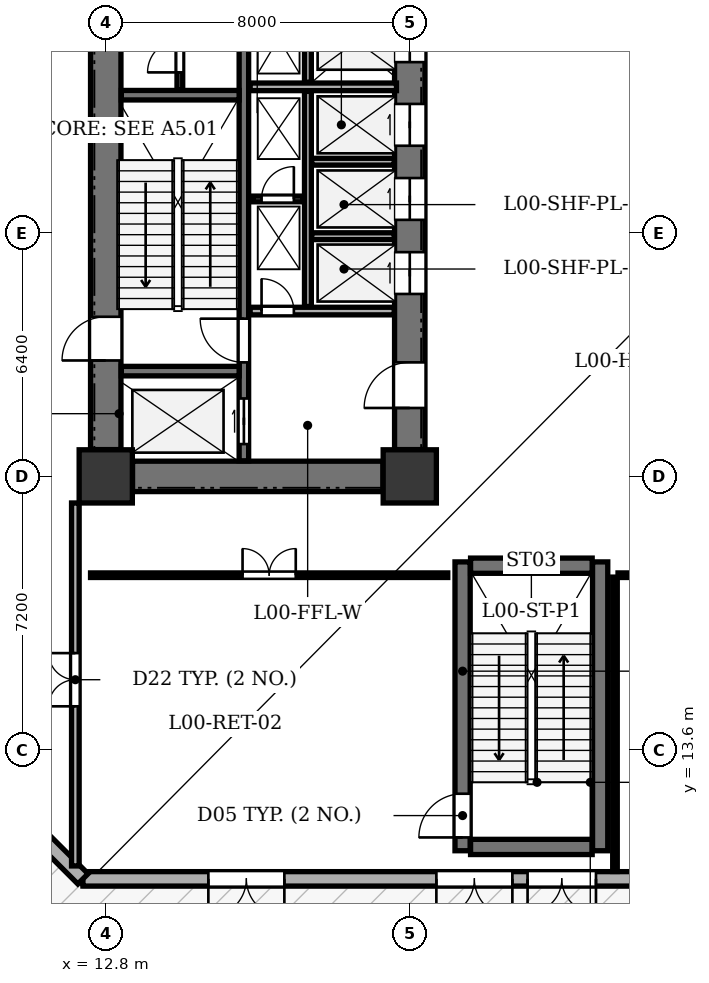
"""IFC4 building model, lengths in metres.
Left out: names, types, materials, properties, quantities, classifications, styles, units other than length and angle.
Written with IfcOpenShell. Run it as: python <this file> out.ifc"""

import sys

from ifc_helpers import new_model, si_unit, direction, frame, frame_2d, origin, origin_2d, place, context, subcontext, project, spatial, rectangle, extrude, element, fill, save


model = new_model("IFC4")
c1 = context("Model", 3, precision=1e-05, world=origin(), true_north=direction((0.0, 1.0)))
c2 = subcontext(c1, "Body", "Model", "MODEL_VIEW")
j1 = project(units=[si_unit("LENGTHUNIT", "METRE"), si_unit("PLANEANGLEUNIT", "RADIAN")], contexts=[c1])
p1 = place(None, origin())
s1 = spatial("IfcSite", under=j1, at=p1, CompositionType="ELEMENT")
p2 = place(p1, origin())
s2 = spatial("IfcBuilding", under=s1, at=p2, CompositionType="ELEMENT")
p3 = place(p2, origin())
s3 = spatial("IfcBuildingStorey", under=s2, at=p3, CompositionType="ELEMENT", Elevation=0.0)
for number, where, z_axis, x_axis in (
    (1, (12.8, 20.8, 0.0), (0.0, 0.0, 1.0), (1.0, 0.0, 0.0)),
    (2, (20.8, 20.8, 0.0), (0.0, 0.0, 1.0), (1.0, 0.0, 0.0)),
):
    element("IfcColumn", number, at=place(p3, frame(where, z_axis=z_axis, x_axis=x_axis)), inside=s3, PredefinedType="COLUMN", context=c2, shape_type="SweptSolid", body=[
        extrude(rectangle(XDim=1.4, YDim=1.4, at=origin_2d()), origin(), (0.0, 0.0, 1.0), 5.4),
    ])
p4 = place(p3, frame((46.3, 10.21, 0.0), z_axis=(0.0, 0.0, 1.0), x_axis=(-1.0, 0.0, 0.0)))
e3 = element("IfcWall", 3, at=p4, inside=s3, PredefinedType="STANDARD", context=c2, shape_type="SweptSolid", body=[
    extrude(rectangle(XDim=34.1, YDim=0.38, at=frame_2d((17.05, 0.0))), origin(), (0.0, 0.0, 1.0), 3.135),
])
p5 = place(p4, frame((13.8, 0.0, 0.0)))
e4 = element("IfcOpeningElement", 4, at=p5, cuts=e3, PredefinedType="OPENING", context=c2, shape_type="SweptSolid", body=[
    extrude(rectangle(XDim=2.0, YDim=2.3, at=frame_2d((1.0, 1.15))), frame((0.0, 0.2, 0.0), z_axis=(0.0, -1.0, 0.0), x_axis=(1.0, 0.0, 0.0)), (0.0, 0.0, 1.0), 0.4),
])
p6 = place(p4, frame((20.6, 0.0, 0.0)))
e5 = element("IfcOpeningElement", 5, at=p6, cuts=e3, PredefinedType="OPENING", context=c2, shape_type="SweptSolid", body=[
    extrude(rectangle(XDim=1.8, YDim=2.3, at=frame_2d((0.9, 1.15))), frame((0.0, 0.2, 0.0), z_axis=(0.0, -1.0, 0.0), x_axis=(1.0, 0.0, 0.0)), (0.0, 0.0, 1.0), 0.4),
])
p7 = place(p4, frame((22.8, 0.0, 0.0)))
e6 = element("IfcOpeningElement", 6, at=p7, cuts=e3, PredefinedType="OPENING", context=c2, shape_type="SweptSolid", body=[
    extrude(rectangle(XDim=2.0, YDim=2.3, at=frame_2d((1.0, 1.15))), frame((0.0, 0.2, 0.0), z_axis=(0.0, -1.0, 0.0), x_axis=(1.0, 0.0, 0.0)), (0.0, 0.0, 1.0), 0.4),
])
p8 = place(p4, frame((28.8, 0.0, 0.0)))
e7 = element("IfcOpeningElement", 7, at=p8, cuts=e3, PredefinedType="OPENING", context=c2, shape_type="SweptSolid", body=[
    extrude(rectangle(XDim=2.0, YDim=2.3, at=frame_2d((1.0, 1.15))), frame((0.0, 0.2, 0.0), z_axis=(0.0, -1.0, 0.0), x_axis=(1.0, 0.0, 0.0)), (0.0, 0.0, 1.0), 0.4),
])
p9 = place(p3, frame((12.2, 10.21, 0.0), z_axis=(0.0, 0.0, 1.0), x_axis=(-0.707106781187, 0.707106781187, 0.0)))
e8 = element("IfcWall", 8, at=p9, inside=s3, PredefinedType="STANDARD", context=c2, shape_type="SweptSolid", body=[
    extrude(rectangle(XDim=3.946, YDim=0.38, at=frame_2d((1.973, 0.0))), origin(), (0.0, 0.0, 1.0), 4.95),
])
p10 = place(p3, frame((12.8, 21.505, 0.0), z_axis=(0.0, 0.0, 1.0), x_axis=(0.0, 1.0, 0.0)))
e9 = element("IfcWall", 9, at=p10, inside=s3, PredefinedType="SHEAR", context=c2, shape_type="SweptSolid", body=[
    extrude(rectangle(XDim=11.39, YDim=0.8, at=frame_2d((5.695, 0.0))), origin(), (0.0, 0.0, 1.0), 4.95),
])
p11 = place(p10, frame((2.345, 0.0, 0.0)))
e10 = element("IfcOpeningElement", 10, at=p11, cuts=e9, PredefinedType="OPENING", context=c2, shape_type="SweptSolid", body=[
    extrude(rectangle(XDim=1.15, YDim=2.15, at=frame_2d((0.575, 1.075))), frame((0.0, 0.41, 0.0), z_axis=(0.0, -1.0, 0.0), x_axis=(1.0, 0.0, 0.0)), (0.0, 0.0, 1.0), 0.82),
])
p12 = place(p3, frame((13.505, 20.8, 0.0), z_axis=(0.0, 0.0, 1.0), x_axis=(1.0, 0.0, 0.0)))
e11 = element("IfcWall", 11, at=p12, inside=s3, PredefinedType="SHEAR", context=c2, shape_type="SweptSolid", body=[
    extrude(rectangle(XDim=6.59, YDim=0.8, at=frame_2d((3.295, 0.0))), origin(), (0.0, 0.0, 1.0), 4.95),
])
p13 = place(p3, frame((20.8, 21.505, 0.0), z_axis=(0.0, 0.0, 1.0), x_axis=(0.0, 1.0, 0.0)))
e12 = element("IfcWall", 12, at=p13, inside=s3, PredefinedType="SHEAR", context=c2, shape_type="SweptSolid", body=[
    extrude(rectangle(XDim=11.39, YDim=0.8, at=frame_2d((5.695, 0.0))), origin(), (0.0, 0.0, 1.0), 4.95),
])
p14 = place(p13, frame((1.095, 0.0, 0.0)))
e13 = element("IfcOpeningElement", 13, at=p14, cuts=e12, PredefinedType="OPENING", context=c2, shape_type="SweptSolid", body=[
    extrude(rectangle(XDim=1.2, YDim=2.15, at=frame_2d((0.6, 1.075))), frame((0.0, 0.41, 0.0), z_axis=(0.0, -1.0, 0.0), x_axis=(1.0, 0.0, 0.0)), (0.0, 0.0, 1.0), 0.82),
])
p15 = place(p13, frame((4.095, 0.0, 0.0)))
e14 = element("IfcOpeningElement", 14, at=p15, cuts=e12, PredefinedType="OPENING", context=c2, shape_type="SweptSolid", body=[
    extrude(rectangle(XDim=1.1, YDim=2.1, at=frame_2d((0.55, 1.05))), frame((0.0, 0.41, 0.0), z_axis=(0.0, -1.0, 0.0), x_axis=(1.0, 0.0, 0.0)), (0.0, 0.0, 1.0), 0.82),
])
p16 = place(p13, frame((6.045, 0.0, 0.0)))
e15 = element("IfcOpeningElement", 15, at=p16, cuts=e12, PredefinedType="OPENING", context=c2, shape_type="SweptSolid", body=[
    extrude(rectangle(XDim=1.1, YDim=2.1, at=frame_2d((0.55, 1.05))), frame((0.0, 0.41, 0.0), z_axis=(0.0, -1.0, 0.0), x_axis=(1.0, 0.0, 0.0)), (0.0, 0.0, 1.0), 0.82),
])
p17 = place(p13, frame((7.995, 0.0, 0.0)))
e16 = element("IfcOpeningElement", 16, at=p17, cuts=e12, PredefinedType="OPENING", context=c2, shape_type="SweptSolid", body=[
    extrude(rectangle(XDim=1.1, YDim=2.1, at=frame_2d((0.55, 1.05))), frame((0.0, 0.41, 0.0), z_axis=(0.0, -1.0, 0.0), x_axis=(1.0, 0.0, 0.0)), (0.0, 0.0, 1.0), 0.82),
])
p18 = place(p13, frame((10.195, 0.0, 0.0)))
e17 = element("IfcOpeningElement", 17, at=p18, cuts=e12, PredefinedType="OPENING", context=c2, shape_type="SweptSolid", body=[
    extrude(rectangle(XDim=1.1, YDim=2.1, at=frame_2d((0.55, 1.05))), frame((0.0, 0.41, 0.0), z_axis=(0.0, -1.0, 0.0), x_axis=(1.0, 0.0, 0.0)), (0.0, 0.0, 1.0), 0.82),
])
p19 = place(p3, frame((16.435, 21.21, 0.0), z_axis=(0.0, 0.0, 1.0), x_axis=(0.0, 1.0, 0.0)))
e18 = element("IfcWall", 18, at=p19, inside=s3, PredefinedType="SHEAR", context=c2, shape_type="SweptSolid", body=[
    extrude(rectangle(XDim=11.98, YDim=0.25, at=frame_2d((5.99, 0.0))), origin(), (0.0, 0.0, 1.0), 4.95),
])
p20 = place(p19, frame((0.44, 0.0, 0.0)))
e19 = element("IfcOpeningElement", 19, at=p20, cuts=e18, PredefinedType="OPENING", context=c2, shape_type="SweptSolid", body=[
    extrude(rectangle(XDim=1.2, YDim=2.15, at=frame_2d((0.6, 1.075))), frame((0.0, 0.135, 0.0), z_axis=(0.0, -1.0, 0.0), x_axis=(1.0, 0.0, 0.0)), (0.0, 0.0, 1.0), 0.27),
])
p21 = place(p19, frame((2.59, 0.0, 0.0)))
e20 = element("IfcOpeningElement", 20, at=p21, cuts=e18, PredefinedType="OPENING", context=c2, shape_type="SweptSolid", body=[
    extrude(rectangle(XDim=1.15, YDim=2.15, at=frame_2d((0.575, 1.075))), frame((0.0, 0.135, 0.0), z_axis=(0.0, -1.0, 0.0), x_axis=(1.0, 0.0, 0.0)), (0.0, 0.0, 1.0), 0.27),
])
for number, where, z_axis, x_axis in (
    (21, (13.21, 23.57, 0.0), (0.0, 0.0, 1.0), (1.0, 0.0, 0.0)),
    (22, (13.21, 30.83, 0.0), (0.0, 0.0, 1.0), (1.0, 0.0, 0.0)),
):
    element("IfcWall", number, at=place(p3, frame(where, z_axis=z_axis, x_axis=x_axis)), inside=s3, PredefinedType="SHEAR", context=c2, shape_type="SweptSolid", body=[
        extrude(rectangle(XDim=3.1, YDim=0.25, at=frame_2d((1.55, 0.0))), origin(), (0.0, 0.0, 1.0), 4.95),
    ])
p22 = place(p3, frame((16.6, 25.15, 0.0), z_axis=(0.0, 0.0, 1.0), x_axis=(1.0, 0.0, 0.0)))
e23 = element("IfcWall", 23, at=p22, inside=s3, PredefinedType="SOLIDWALL", context=c2, shape_type="SweptSolid", body=[
    extrude(rectangle(XDim=3.79, YDim=0.2, at=frame_2d((1.895, 0.0))), origin(), (0.0, 0.0, 1.0), 4.95),
])
p23 = place(p22, frame((0.3, 0.0, 0.0)))
e24 = element("IfcOpeningElement", 24, at=p23, cuts=e23, PredefinedType="OPENING", context=c2, shape_type="SweptSolid", body=[
    extrude(rectangle(XDim=0.85, YDim=2.02, at=frame_2d((0.425, 1.01))), frame((0.0, 0.11, 0.0), z_axis=(0.0, -1.0, 0.0), x_axis=(1.0, 0.0, 0.0)), (0.0, 0.0, 1.0), 0.22),
])
p24 = place(p3, frame((16.6, 31.05, 0.0), z_axis=(0.0, 0.0, 1.0), x_axis=(1.0, 0.0, 0.0)))
e25 = element("IfcWall", 25, at=p24, inside=s3, PredefinedType="SOLIDWALL", context=c2, shape_type="SweptSolid", body=[
    extrude(rectangle(XDim=3.85, YDim=0.2, at=frame_2d((1.925, 0.0))), origin(), (0.0, 0.0, 1.0), 4.95),
])
p25 = place(p3, frame((18.12, 25.27, 0.0), z_axis=(0.0, 0.0, 1.0), x_axis=(0.0, 1.0, 0.0)))
e26 = element("IfcWall", 26, at=p25, inside=s3, PredefinedType="PARTITIONING", context=c2, shape_type="SweptSolid", body=[
    extrude(rectangle(XDim=5.66, YDim=0.18, at=frame_2d((2.83, 0.0))), origin(), (0.0, 0.0, 1.0), 4.95),
])
p26 = place(p3, frame((18.12, 31.17, 0.0), z_axis=(0.0, 0.0, 1.0), x_axis=(0.0, 1.0, 0.0)))
e27 = element("IfcWall", 27, at=p26, inside=s3, PredefinedType="PARTITIONING", context=c2, shape_type="SweptSolid", body=[
    extrude(rectangle(XDim=2.02, YDim=0.18, at=frame_2d((1.01, 0.0))), origin(), (0.0, 0.0, 1.0), 4.95),
])
for number, where, z_axis, x_axis in (
    (28, (18.22, 27.12, 0.0), (0.0, 0.0, 1.0), (1.0, 0.0, 0.0)),
    (29, (18.22, 29.08, 0.0), (0.0, 0.0, 1.0), (1.0, 0.0, 0.0)),
):
    element("IfcWall", number, at=place(p3, frame(where, z_axis=z_axis, x_axis=x_axis)), inside=s3, PredefinedType="PARTITIONING", context=c2, shape_type="SweptSolid", body=[
        extrude(rectangle(XDim=2.17, YDim=0.18, at=frame_2d((1.085, 0.0))), origin(), (0.0, 0.0, 1.0), 4.95),
    ])
p27 = place(p3, frame((22.19, 10.95, 0.0), z_axis=(0.0, 0.0, 1.0), x_axis=(0.0, 1.0, 0.0)))
e30 = element("IfcWall", 30, at=p27, inside=s3, PredefinedType="SHEAR", context=c2, shape_type="SweptSolid", body=[
    extrude(rectangle(XDim=7.6, YDim=0.4, at=frame_2d((3.8, 0.0))), origin(), (0.0, 0.0, 1.0), 4.95),
])
p28 = place(p27, frame((0.35, 0.0, 0.0)))
e31 = element("IfcOpeningElement", 31, at=p28, cuts=e30, PredefinedType="OPENING", context=c2, shape_type="SweptSolid", body=[
    extrude(rectangle(XDim=1.15, YDim=2.15, at=frame_2d((0.575, 1.075))), frame((0.0, 0.21, 0.0), z_axis=(0.0, -1.0, 0.0), x_axis=(1.0, 0.0, 0.0)), (0.0, 0.0, 1.0), 0.42),
])
p29 = place(p3, frame((25.81, 10.95, 0.0), z_axis=(0.0, 0.0, 1.0), x_axis=(0.0, 1.0, 0.0)))
e32 = element("IfcWall", 32, at=p29, inside=s3, PredefinedType="SHEAR", context=c2, shape_type="SweptSolid", body=[
    extrude(rectangle(XDim=7.6, YDim=0.4, at=frame_2d((3.8, 0.0))), origin(), (0.0, 0.0, 1.0), 4.95),
])
for number, where, z_axis, x_axis in (
    (33, (22.4, 11.05, 0.0), (0.0, 0.0, 1.0), (1.0, 0.0, 0.0)),
    (34, (22.4, 18.45, 0.0), (0.0, 0.0, 1.0), (1.0, 0.0, 0.0)),
):
    element("IfcWall", number, at=place(p3, frame(where, z_axis=z_axis, x_axis=x_axis)), inside=s3, PredefinedType="SHEAR", context=c2, shape_type="SweptSolid", body=[
        extrude(rectangle(XDim=3.2, YDim=0.4, at=frame_2d((1.6, 0.0))), origin(), (0.0, 0.0, 1.0), 4.95),
    ])
p30 = place(p3, frame((14.75, 30.96, 0.0), z_axis=(0.0, 0.0, 1.0), x_axis=(0.0, 1.0, 0.0)))
e35 = element("IfcWall", 35, at=p30, inside=s3, PredefinedType="PARTITIONING", context=c2, shape_type="SweptSolid", body=[
    extrude(rectangle(XDim=2.235, YDim=0.15, at=frame_2d((1.118, 0.0))), origin(), (0.0, 0.0, 1.0), 4.95),
])
p31 = place(p30, frame((0.47, 0.0, 0.0)))
e36 = element("IfcOpeningElement", 36, at=p31, cuts=e35, PredefinedType="OPENING", context=c2, shape_type="SweptSolid", body=[
    extrude(rectangle(XDim=0.85, YDim=2.02, at=frame_2d((0.425, 1.01))), frame((0.0, 0.085, 0.0), z_axis=(0.0, -1.0, 0.0), x_axis=(1.0, 0.0, 0.0)), (0.0, 0.0, 1.0), 0.17),
])
p32 = place(p3, frame((16.68, 28.1, 0.0), z_axis=(0.0, 0.0, 1.0), x_axis=(1.0, 0.0, 0.0)))
e37 = element("IfcWall", 37, at=p32, inside=s3, PredefinedType="PARTITIONING", context=c2, shape_type="SweptSolid", body=[
    extrude(rectangle(XDim=1.32, YDim=0.15, at=frame_2d((0.66, 0.0))), origin(), (0.0, 0.0, 1.0), 4.95),
])
p33 = place(p32, frame((0.22, 0.0, 0.0)))
e38 = element("IfcOpeningElement", 38, at=p33, cuts=e37, PredefinedType="OPENING", context=c2, shape_type="SweptSolid", body=[
    extrude(rectangle(XDim=0.85, YDim=2.02, at=frame_2d((0.425, 1.01))), frame((0.0, 0.085, 0.0), z_axis=(0.0, -1.0, 0.0), x_axis=(1.0, 0.0, 0.0)), (0.0, 0.0, 1.0), 0.17),
])
p34 = place(p3, frame((12.0, 10.55, 0.0), z_axis=(0.0, 0.0, 1.0), x_axis=(0.0, 1.0, 0.0)))
e39 = element("IfcWall", 39, at=p34, inside=s3, PredefinedType="SOLIDWALL", context=c2, shape_type="SweptSolid", body=[
    extrude(rectangle(XDim=9.55, YDim=0.2, at=frame_2d((4.775, 0.0))), origin(), (0.0, 0.0, 1.0), 4.95),
])
p35 = place(p34, frame((4.2, 0.0, 0.0)))
e40 = element("IfcOpeningElement", 40, at=p35, cuts=e39, PredefinedType="OPENING", context=c2, shape_type="SweptSolid", body=[
    extrude(rectangle(XDim=1.4, YDim=2.15, at=frame_2d((0.7, 1.075))), frame((0.0, 0.11, 0.0), z_axis=(0.0, -1.0, 0.0), x_axis=(1.0, 0.0, 0.0)), (0.0, 0.0, 1.0), 0.22),
])
p36 = place(p3, frame((26.2, 10.405, 0.0), z_axis=(0.0, 0.0, 1.0), x_axis=(0.0, 1.0, 0.0)))
e41 = element("IfcWall", 41, at=p36, inside=s3, PredefinedType="PARTITIONING", context=c2, shape_type="SweptSolid", body=[
    extrude(rectangle(XDim=7.745, YDim=0.12, at=frame_2d((3.873, 0.0))), origin(), (0.0, 0.0, 1.0), 4.385),
])
p37 = place(p3, frame((26.28, 18.2, 0.0), z_axis=(0.0, 0.0, 1.0), x_axis=(1.0, 0.0, 0.0)))
e42 = element("IfcWall", 42, at=p37, inside=s3, PredefinedType="PARTITIONING", context=c2, shape_type="SweptSolid", body=[
    extrude(rectangle(XDim=8.04, YDim=0.12, at=frame_2d((4.02, 0.0))), origin(), (0.0, 0.0, 1.0), 4.95),
])
p38 = place(p37, frame((3.3, 0.0, 0.0)))
e43 = element("IfcOpeningElement", 43, at=p38, cuts=e42, PredefinedType="OPENING", context=c2, shape_type="SweptSolid", body=[
    extrude(rectangle(XDim=1.4, YDim=2.15, at=frame_2d((0.7, 1.075))), frame((0.0, 0.07, 0.0), z_axis=(0.0, -1.0, 0.0), x_axis=(1.0, 0.0, 0.0)), (0.0, 0.0, 1.0), 0.14),
])
p39 = place(p3, frame((12.4, 18.2, 0.0), z_axis=(0.0, 0.0, 1.0), x_axis=(1.0, 0.0, 0.0)))
e44 = element("IfcWall", 44, at=p39, inside=s3, PredefinedType="PARTITIONING", context=c2, shape_type="SweptSolid", body=[
    extrude(rectangle(XDim=9.4, YDim=0.12, at=frame_2d((4.7, 0.0))), origin(), (0.0, 0.0, 1.0), 4.95),
])
p40 = place(p39, frame((4.0, 0.0, 0.0)))
e45 = element("IfcOpeningElement", 45, at=p40, cuts=e44, PredefinedType="OPENING", context=c2, shape_type="SweptSolid", body=[
    extrude(rectangle(XDim=1.4, YDim=2.15, at=frame_2d((0.7, 1.075))), frame((0.0, 0.07, 0.0), z_axis=(0.0, -1.0, 0.0), x_axis=(1.0, 0.0, 0.0)), (0.0, 0.0, 1.0), 0.14),
])
p41 = place(p6, origin())
e46 = element("IfcDoor", 46, at=p41, inside=s3, OperationType="DOUBLE_DOOR_SINGLE_SWING", PredefinedType="DOOR", context=c2, shape_type="SweptSolid", body=[
    extrude(rectangle(XDim=1.8, YDim=2.3, at=frame_2d((0.9, 1.15))), frame((0.0, 0.025, 0.0), z_axis=(0.0, -1.0, 0.0), x_axis=(1.0, 0.0, 0.0)), (0.0, 0.0, 1.0), 0.05),
])
fill(e5, e46)
p42 = place(p7, origin())
e47 = element("IfcDoor", 47, at=p42, inside=s3, OperationType="DOUBLE_DOOR_SINGLE_SWING", PredefinedType="DOOR", context=c2, shape_type="SweptSolid", body=[
    extrude(rectangle(XDim=2.0, YDim=2.3, at=frame_2d((1.0, 1.15))), frame((0.0, 0.025, 0.0), z_axis=(0.0, -1.0, 0.0), x_axis=(1.0, 0.0, 0.0)), (0.0, 0.0, 1.0), 0.05),
])
fill(e6, e47)
p43 = place(p8, origin())
e48 = element("IfcDoor", 48, at=p43, inside=s3, OperationType="DOUBLE_DOOR_SINGLE_SWING", PredefinedType="DOOR", context=c2, shape_type="SweptSolid", body=[
    extrude(rectangle(XDim=2.0, YDim=2.3, at=frame_2d((1.0, 1.15))), frame((0.0, 0.025, 0.0), z_axis=(0.0, -1.0, 0.0), x_axis=(1.0, 0.0, 0.0)), (0.0, 0.0, 1.0), 0.05),
])
fill(e7, e48)
p44 = place(p11, origin())
e49 = element("IfcDoor", 49, at=p44, inside=s3, OperationType="SINGLE_SWING_LEFT", PredefinedType="DOOR", context=c2, shape_type="SweptSolid", body=[
    extrude(rectangle(XDim=1.15, YDim=2.15, at=frame_2d((0.575, 1.075))), frame((0.0, 0.025, 0.0), z_axis=(0.0, -1.0, 0.0), x_axis=(1.0, 0.0, 0.0)), (0.0, 0.0, 1.0), 0.05),
])
fill(e10, e49)
p45 = place(p14, origin())
e50 = element("IfcDoor", 50, at=p45, inside=s3, OperationType="SINGLE_SWING_LEFT", PredefinedType="DOOR", context=c2, shape_type="SweptSolid", body=[
    extrude(rectangle(XDim=1.2, YDim=2.15, at=frame_2d((0.6, 1.075))), frame((0.0, 0.025, 0.0), z_axis=(0.0, -1.0, 0.0), x_axis=(1.0, 0.0, 0.0)), (0.0, 0.0, 1.0), 0.05),
])
fill(e13, e50)
p46 = place(p15, origin())
e51 = element("IfcDoor", 51, at=p46, inside=s3, OperationType="DOUBLE_DOOR_SLIDING", PredefinedType="DOOR", context=c2, shape_type="SweptSolid", body=[
    extrude(rectangle(XDim=1.1, YDim=2.1, at=frame_2d((0.55, 1.05))), frame((0.0, 0.025, 0.0), z_axis=(0.0, -1.0, 0.0), x_axis=(1.0, 0.0, 0.0)), (0.0, 0.0, 1.0), 0.05),
])
fill(e14, e51)
p47 = place(p16, origin())
e52 = element("IfcDoor", 52, at=p47, inside=s3, OperationType="DOUBLE_DOOR_SLIDING", PredefinedType="DOOR", context=c2, shape_type="SweptSolid", body=[
    extrude(rectangle(XDim=1.1, YDim=2.1, at=frame_2d((0.55, 1.05))), frame((0.0, 0.025, 0.0), z_axis=(0.0, -1.0, 0.0), x_axis=(1.0, 0.0, 0.0)), (0.0, 0.0, 1.0), 0.05),
])
fill(e15, e52)
p48 = place(p17, origin())
e53 = element("IfcDoor", 53, at=p48, inside=s3, OperationType="DOUBLE_DOOR_SLIDING", PredefinedType="DOOR", context=c2, shape_type="SweptSolid", body=[
    extrude(rectangle(XDim=1.1, YDim=2.1, at=frame_2d((0.55, 1.05))), frame((0.0, 0.025, 0.0), z_axis=(0.0, -1.0, 0.0), x_axis=(1.0, 0.0, 0.0)), (0.0, 0.0, 1.0), 0.05),
])
fill(e16, e53)
p49 = place(p18, origin())
e54 = element("IfcDoor", 54, at=p49, inside=s3, OperationType="DOUBLE_DOOR_SLIDING", PredefinedType="DOOR", context=c2, shape_type="SweptSolid", body=[
    extrude(rectangle(XDim=1.1, YDim=2.1, at=frame_2d((0.55, 1.05))), frame((0.0, 0.025, 0.0), z_axis=(0.0, -1.0, 0.0), x_axis=(1.0, 0.0, 0.0)), (0.0, 0.0, 1.0), 0.05),
])
fill(e17, e54)
p50 = place(p20, origin())
e55 = element("IfcDoor", 55, at=p50, inside=s3, OperationType="DOUBLE_DOOR_SLIDING", PredefinedType="DOOR", context=c2, shape_type="SweptSolid", body=[
    extrude(rectangle(XDim=1.2, YDim=2.15, at=frame_2d((0.6, 1.075))), frame((0.0, 0.025, 0.0), z_axis=(0.0, -1.0, 0.0), x_axis=(1.0, 0.0, 0.0)), (0.0, 0.0, 1.0), 0.05),
])
fill(e19, e55)
p51 = place(p21, origin())
e56 = element("IfcDoor", 56, at=p51, inside=s3, OperationType="SINGLE_SWING_RIGHT", PredefinedType="DOOR", context=c2, shape_type="SweptSolid", body=[
    extrude(rectangle(XDim=1.15, YDim=2.15, at=frame_2d((0.575, 1.075))), frame((0.0, 0.025, 0.0), z_axis=(0.0, -1.0, 0.0), x_axis=(1.0, 0.0, 0.0)), (0.0, 0.0, 1.0), 0.05),
])
fill(e20, e56)
p52 = place(p23, origin())
e57 = element("IfcDoor", 57, at=p52, inside=s3, OperationType="SINGLE_SWING_LEFT", PredefinedType="DOOR", context=c2, shape_type="SweptSolid", body=[
    extrude(rectangle(XDim=0.85, YDim=2.02, at=frame_2d((0.425, 1.01))), frame((0.0, 0.025, 0.0), z_axis=(0.0, -1.0, 0.0), x_axis=(1.0, 0.0, 0.0)), (0.0, 0.0, 1.0), 0.05),
])
fill(e24, e57)
p53 = place(p28, origin())
e58 = element("IfcDoor", 58, at=p53, inside=s3, OperationType="SINGLE_SWING_LEFT", PredefinedType="DOOR", context=c2, shape_type="SweptSolid", body=[
    extrude(rectangle(XDim=1.15, YDim=2.15, at=frame_2d((0.575, 1.075))), frame((0.0, 0.025, 0.0), z_axis=(0.0, -1.0, 0.0), x_axis=(1.0, 0.0, 0.0)), (0.0, 0.0, 1.0), 0.05),
])
fill(e31, e58)
p54 = place(p31, origin())
e59 = element("IfcDoor", 59, at=p54, inside=s3, OperationType="SINGLE_SWING_LEFT", PredefinedType="DOOR", context=c2, shape_type="SweptSolid", body=[
    extrude(rectangle(XDim=0.85, YDim=2.02, at=frame_2d((0.425, 1.01))), frame((0.0, 0.025, 0.0), z_axis=(0.0, -1.0, 0.0), x_axis=(1.0, 0.0, 0.0)), (0.0, 0.0, 1.0), 0.05),
])
fill(e36, e59)
p55 = place(p33, origin())
e60 = element("IfcDoor", 60, at=p55, inside=s3, OperationType="SINGLE_SWING_RIGHT", PredefinedType="DOOR", context=c2, shape_type="SweptSolid", body=[
    extrude(rectangle(XDim=0.85, YDim=2.02, at=frame_2d((0.425, 1.01))), frame((0.0, 0.025, 0.0), z_axis=(0.0, -1.0, 0.0), x_axis=(1.0, 0.0, 0.0)), (0.0, 0.0, 1.0), 0.05),
])
fill(e38, e60)
p56 = place(p35, origin())
e61 = element("IfcDoor", 61, at=p56, inside=s3, OperationType="DOUBLE_DOOR_SINGLE_SWING", PredefinedType="DOOR", context=c2, shape_type="SweptSolid", body=[
    extrude(rectangle(XDim=1.4, YDim=2.15, at=frame_2d((0.7, 1.075))), frame((0.0, 0.025, 0.0), z_axis=(0.0, -1.0, 0.0), x_axis=(1.0, 0.0, 0.0)), (0.0, 0.0, 1.0), 0.05),
])
fill(e40, e61)
p57 = place(p40, origin())
e62 = element("IfcDoor", 62, at=p57, inside=s3, OperationType="DOUBLE_DOOR_SINGLE_SWING", PredefinedType="DOOR", context=c2, shape_type="SweptSolid", body=[
    extrude(rectangle(XDim=1.4, YDim=2.15, at=frame_2d((0.7, 1.075))), frame((0.0, 0.025, 0.0), z_axis=(0.0, -1.0, 0.0), x_axis=(1.0, 0.0, 0.0)), (0.0, 0.0, 1.0), 0.05),
])
fill(e45, e62)
save(model, sys.argv[1])
